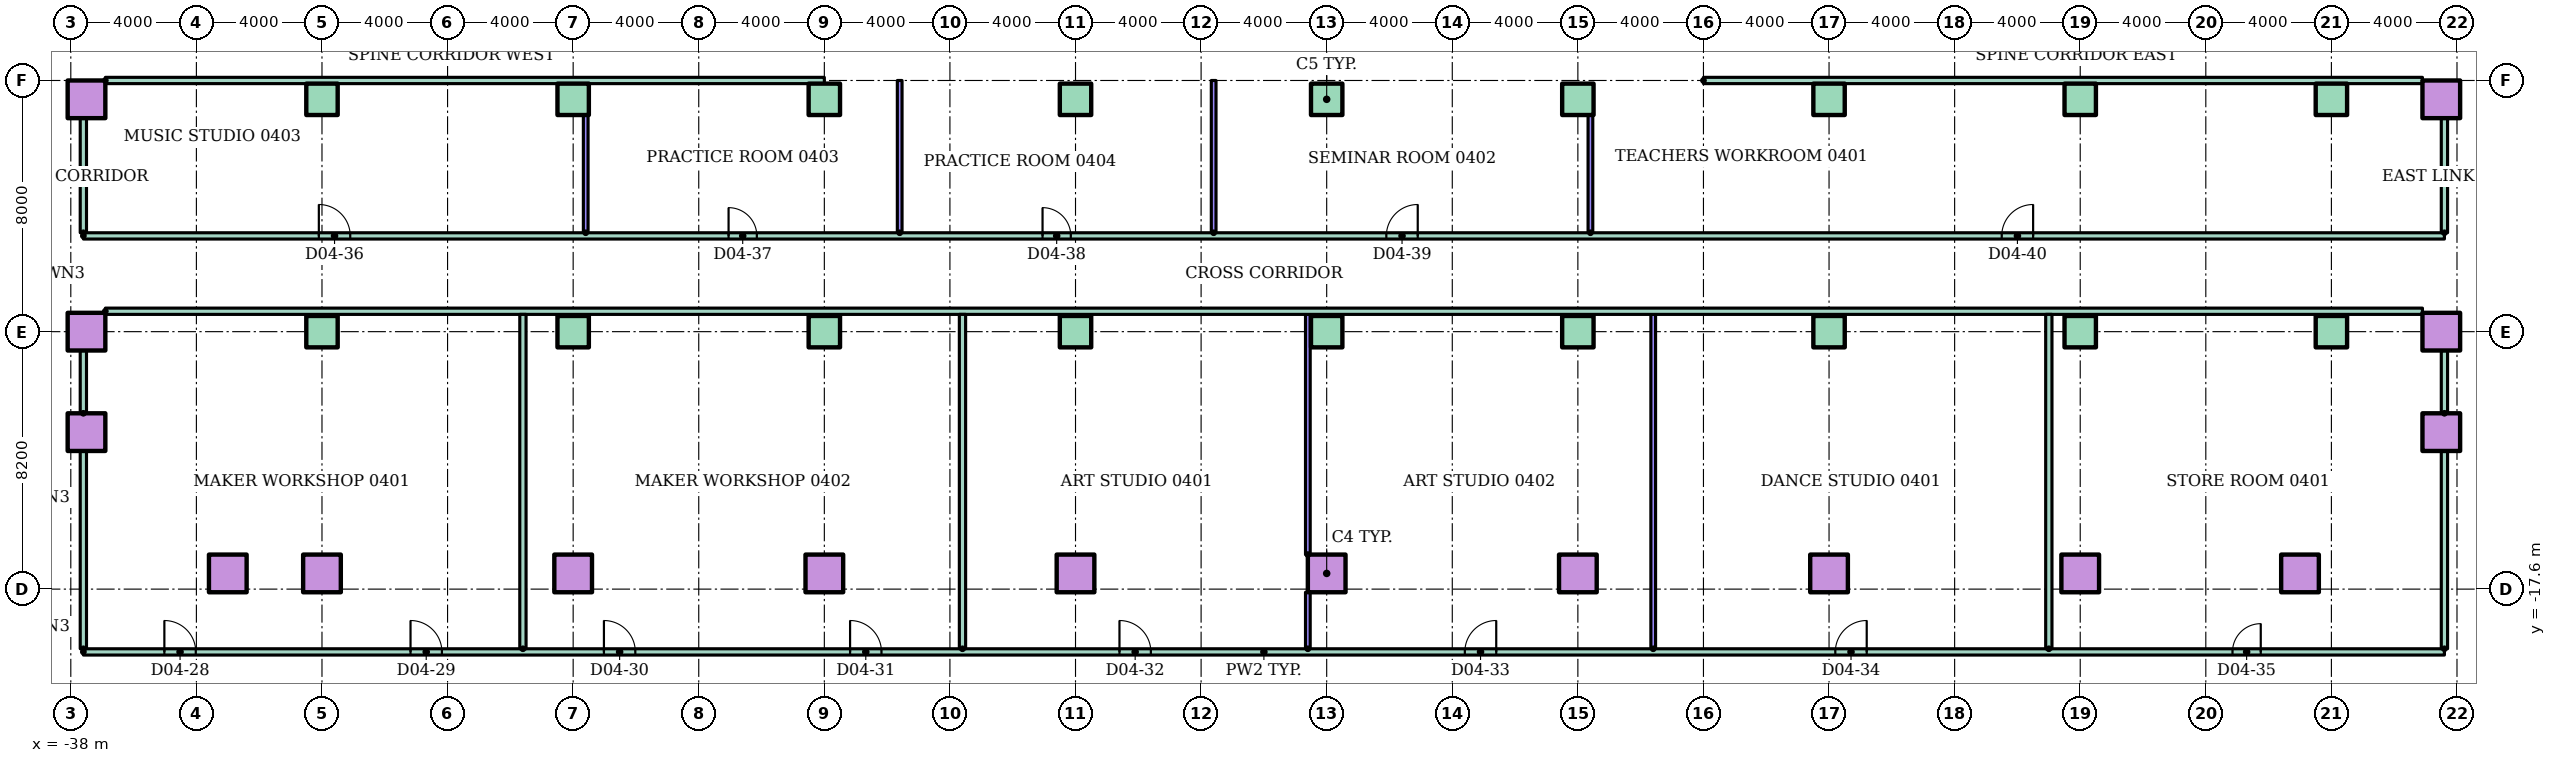
"""IFC4 building model, lengths in metres.
Left out: names, types, materials, properties, quantities, classifications, styles, units other than length and angle.
Written with IfcOpenShell. Run it as: python <this file> out.ifc"""

import sys

from ifc_helpers import new_model, si_unit, direction, frame, frame_2d, origin, origin_2d, place, context, subcontext, project, spatial, rectangle, hollow_rectangle, extrude, element, fill, save


model = new_model("IFC4")
c1 = context("Model", 3, precision=1e-05, world=origin(), true_north=direction((0.0, 1.0)))
c2 = subcontext(c1, "Body", "Model", "MODEL_VIEW")
j1 = project(units=[si_unit("LENGTHUNIT", "METRE"), si_unit("PLANEANGLEUNIT", "RADIAN")], contexts=[c1])
p1 = place(None, origin())
s1 = spatial("IfcSite", under=j1, at=p1, CompositionType="ELEMENT")
p2 = place(p1, origin())
s2 = spatial("IfcBuilding", under=s1, at=p2, CompositionType="ELEMENT")
p3 = place(p2, frame((0.0, 0.0, 18.0)))
s3 = spatial("IfcBuildingStorey", under=s2, at=p3, CompositionType="ELEMENT", Elevation=18.0)
for number, where in (
    (1, (-33.0, -17.1, 0.0)),
    (2, (-30.0, -17.1, 0.0)),
    (3, (-22.0, -17.1, 0.0)),
    (4, (-14.0, -17.1, 0.0)),
    (5, (-6.0, -17.1, 0.0)),
    (6, (2.0, -17.1, 0.0)),
    (7, (10.0, -17.1, 0.0)),
    (8, (18.0, -17.1, 0.0)),
    (9, (26.0, -17.1, 0.0)),
    (10, (33.0, -17.1, 0.0)),
    (11, (-37.5, -12.6, 0.0)),
    (12, (37.5, -12.6, 0.0)),
    (13, (-37.5, -9.4, 0.0)),
):
    element("IfcColumn", number, at=place(p3, frame(where)), inside=s3, PredefinedType="COLUMN", context=c2, shape_type="SweptSolid", body=[
        extrude(hollow_rectangle(XDim=1.2, YDim=1.2, WallThickness=0.06, at=origin_2d()), origin(), (0.0, 0.0, 1.0), 4.0),
    ])
for number, where in (
    (14, (-30.0, -9.4, 0.0)),
    (15, (-22.0, -9.4, 0.0)),
    (16, (-14.0, -9.4, 0.0)),
    (17, (-6.0, -9.4, 0.0)),
    (18, (2.0, -9.4, 0.0)),
    (19, (10.0, -9.4, 0.0)),
    (20, (18.0, -9.4, 0.0)),
    (21, (26.0, -9.4, 0.0)),
    (22, (34.0, -9.4, 0.0)),
):
    element("IfcColumn", number, at=place(p3, frame(where)), inside=s3, PredefinedType="COLUMN", context=c2, shape_type="SweptSolid", body=[
        extrude(rectangle(XDim=1.0, YDim=1.0, at=origin_2d()), origin(), (0.0, 0.0, 1.0), 4.0),
    ])
for number, where in (
    (23, (37.5, -9.4, 0.0)),
    (24, (-37.5, -2.0, 0.0)),
):
    element("IfcColumn", number, at=place(p3, frame(where)), inside=s3, PredefinedType="COLUMN", context=c2, shape_type="SweptSolid", body=[
        extrude(hollow_rectangle(XDim=1.2, YDim=1.2, WallThickness=0.06, at=origin_2d()), origin(), (0.0, 0.0, 1.0), 4.0),
    ])
for number, where in (
    (25, (-30.0, -2.0, 0.0)),
    (26, (-22.0, -2.0, 0.0)),
    (27, (-14.0, -2.0, 0.0)),
    (28, (-6.0, -2.0, 0.0)),
    (29, (2.0, -2.0, 0.0)),
    (30, (10.0, -2.0, 0.0)),
    (31, (18.0, -2.0, 0.0)),
    (32, (26.0, -2.0, 0.0)),
    (33, (34.0, -2.0, 0.0)),
):
    element("IfcColumn", number, at=place(p3, frame(where)), inside=s3, PredefinedType="COLUMN", context=c2, shape_type="SweptSolid", body=[
        extrude(rectangle(XDim=1.0, YDim=1.0, at=origin_2d()), origin(), (0.0, 0.0, 1.0), 4.0),
    ])
p4 = place(p3, frame((37.5, -2.0, 0.0)))
e34 = element("IfcColumn", 34, at=p4, inside=s3, PredefinedType="COLUMN", context=c2, shape_type="SweptSolid", body=[
    extrude(hollow_rectangle(XDim=1.2, YDim=1.2, WallThickness=0.06, at=origin_2d()), origin(), (0.0, 0.0, 1.0), 4.0),
])
p5 = place(p3, frame((-37.6, -19.6, 0.0)))
e35 = element("IfcWall", 35, at=p5, inside=s3, PredefinedType="PARTITIONING", context=c2, shape_type="SweptSolid", body=[
    extrude(rectangle(XDim=75.2, YDim=0.2, at=frame_2d((37.6, 0.0))), origin(), (0.0, 0.0, 1.0), 3.7),
])
p6 = place(p5, frame((2.58, 0.0, 0.0)))
e36 = element("IfcOpeningElement", 36, at=p6, cuts=e35, PredefinedType="OPENING", context=c2, shape_type="SweptSolid", body=[
    extrude(rectangle(XDim=1.0, YDim=2.1, at=frame_2d((0.5, 1.05))), frame((0.0, 0.11, 0.0), z_axis=(0.0, -1.0, 0.0), x_axis=(1.0, 0.0, 0.0)), (0.0, 0.0, 1.0), 0.22),
])
p7 = place(p5, frame((10.42, 0.0, 0.0)))
e37 = element("IfcOpeningElement", 37, at=p7, cuts=e35, PredefinedType="OPENING", context=c2, shape_type="SweptSolid", body=[
    extrude(rectangle(XDim=1.0, YDim=2.1, at=frame_2d((0.5, 1.05))), frame((0.0, 0.11, 0.0), z_axis=(0.0, -1.0, 0.0), x_axis=(1.0, 0.0, 0.0)), (0.0, 0.0, 1.0), 0.22),
])
p8 = place(p5, frame((16.58, 0.0, 0.0)))
e38 = element("IfcOpeningElement", 38, at=p8, cuts=e35, PredefinedType="OPENING", context=c2, shape_type="SweptSolid", body=[
    extrude(rectangle(XDim=1.0, YDim=2.1, at=frame_2d((0.5, 1.05))), frame((0.0, 0.11, 0.0), z_axis=(0.0, -1.0, 0.0), x_axis=(1.0, 0.0, 0.0)), (0.0, 0.0, 1.0), 0.22),
])
p9 = place(p5, frame((24.42, 0.0, 0.0)))
e39 = element("IfcOpeningElement", 39, at=p9, cuts=e35, PredefinedType="OPENING", context=c2, shape_type="SweptSolid", body=[
    extrude(rectangle(XDim=1.0, YDim=2.1, at=frame_2d((0.5, 1.05))), frame((0.0, 0.11, 0.0), z_axis=(0.0, -1.0, 0.0), x_axis=(1.0, 0.0, 0.0)), (0.0, 0.0, 1.0), 0.22),
])
p10 = place(p5, frame((33.0, 0.0, 0.0)))
e40 = element("IfcOpeningElement", 40, at=p10, cuts=e35, PredefinedType="OPENING", context=c2, shape_type="SweptSolid", body=[
    extrude(rectangle(XDim=1.0, YDim=2.1, at=frame_2d((0.5, 1.05))), frame((0.0, 0.11, 0.0), z_axis=(0.0, -1.0, 0.0), x_axis=(1.0, 0.0, 0.0)), (0.0, 0.0, 1.0), 0.22),
])
p11 = place(p5, frame((44.0, 0.0, 0.0)))
e41 = element("IfcOpeningElement", 41, at=p11, cuts=e35, PredefinedType="OPENING", context=c2, shape_type="SweptSolid", body=[
    extrude(rectangle(XDim=1.0, YDim=2.1, at=frame_2d((0.5, 1.05))), frame((0.0, 0.11, 0.0), z_axis=(0.0, -1.0, 0.0), x_axis=(1.0, 0.0, 0.0)), (0.0, 0.0, 1.0), 0.22),
])
p12 = place(p5, frame((55.8, 0.0, 0.0)))
e42 = element("IfcOpeningElement", 42, at=p12, cuts=e35, PredefinedType="OPENING", context=c2, shape_type="SweptSolid", body=[
    extrude(rectangle(XDim=1.0, YDim=2.1, at=frame_2d((0.5, 1.05))), frame((0.0, 0.11, 0.0), z_axis=(0.0, -1.0, 0.0), x_axis=(1.0, 0.0, 0.0)), (0.0, 0.0, 1.0), 0.22),
])
p13 = place(p5, frame((68.45, 0.0, 0.0)))
e43 = element("IfcOpeningElement", 43, at=p13, cuts=e35, PredefinedType="OPENING", context=c2, shape_type="SweptSolid", body=[
    extrude(rectangle(XDim=0.9, YDim=2.1, at=frame_2d((0.45, 1.05))), frame((0.0, 0.11, 0.0), z_axis=(0.0, -1.0, 0.0), x_axis=(1.0, 0.0, 0.0)), (0.0, 0.0, 1.0), 0.22),
])
p14 = place(p3, frame((-36.9, -8.75, 0.0)))
e44 = element("IfcWall", 44, at=p14, inside=s3, PredefinedType="PARTITIONING", context=c2, shape_type="SweptSolid", body=[
    extrude(rectangle(XDim=73.8, YDim=0.2, at=frame_2d((36.9, 0.0))), origin(), (0.0, 0.0, 1.0), 3.7),
])
p15 = place(p3, frame((-37.6, -6.35, 0.0)))
e45 = element("IfcWall", 45, at=p15, inside=s3, PredefinedType="PARTITIONING", context=c2, shape_type="SweptSolid", body=[
    extrude(rectangle(XDim=75.2, YDim=0.2, at=frame_2d((37.6, 0.0))), origin(), (0.0, 0.0, 1.0), 3.7),
])
p16 = place(p15, frame((7.5, 0.0, 0.0)))
e46 = element("IfcOpeningElement", 46, at=p16, cuts=e45, PredefinedType="OPENING", context=c2, shape_type="SweptSolid", body=[
    extrude(rectangle(XDim=1.0, YDim=2.1, at=frame_2d((0.5, 1.05))), frame((0.0, 0.11, 0.0), z_axis=(0.0, -1.0, 0.0), x_axis=(1.0, 0.0, 0.0)), (0.0, 0.0, 1.0), 0.22),
])
p17 = place(p15, frame((20.55, 0.0, 0.0)))
e47 = element("IfcOpeningElement", 47, at=p17, cuts=e45, PredefinedType="OPENING", context=c2, shape_type="SweptSolid", body=[
    extrude(rectangle(XDim=0.9, YDim=2.1, at=frame_2d((0.45, 1.05))), frame((0.0, 0.11, 0.0), z_axis=(0.0, -1.0, 0.0), x_axis=(1.0, 0.0, 0.0)), (0.0, 0.0, 1.0), 0.22),
])
p18 = place(p15, frame((30.55, 0.0, 0.0)))
e48 = element("IfcOpeningElement", 48, at=p18, cuts=e45, PredefinedType="OPENING", context=c2, shape_type="SweptSolid", body=[
    extrude(rectangle(XDim=0.9, YDim=2.1, at=frame_2d((0.45, 1.05))), frame((0.0, 0.11, 0.0), z_axis=(0.0, -1.0, 0.0), x_axis=(1.0, 0.0, 0.0)), (0.0, 0.0, 1.0), 0.22),
])
p19 = place(p15, frame((41.5, 0.0, 0.0)))
e49 = element("IfcOpeningElement", 49, at=p19, cuts=e45, PredefinedType="OPENING", context=c2, shape_type="SweptSolid", body=[
    extrude(rectangle(XDim=1.0, YDim=2.1, at=frame_2d((0.5, 1.05))), frame((0.0, 0.11, 0.0), z_axis=(0.0, -1.0, 0.0), x_axis=(1.0, 0.0, 0.0)), (0.0, 0.0, 1.0), 0.22),
])
p20 = place(p15, frame((61.1, 0.0, 0.0)))
e50 = element("IfcOpeningElement", 50, at=p20, cuts=e45, PredefinedType="OPENING", context=c2, shape_type="SweptSolid", body=[
    extrude(rectangle(XDim=1.0, YDim=2.1, at=frame_2d((0.5, 1.05))), frame((0.0, 0.11, 0.0), z_axis=(0.0, -1.0, 0.0), x_axis=(1.0, 0.0, 0.0)), (0.0, 0.0, 1.0), 0.22),
])
for number, where in (
    (51, (-36.9, -1.4, 0.0)),
    (52, (14.0, -1.4, 0.0)),
):
    element("IfcWall", number, at=place(p3, frame(where)), inside=s3, PredefinedType="PARTITIONING", context=c2, shape_type="SweptSolid", body=[
        extrude(rectangle(XDim=22.9, YDim=0.2, at=frame_2d((11.45, 0.0))), origin(), (0.0, 0.0, 1.0), 3.7),
    ])
p21 = place(p3, frame((-37.6, -19.5, 0.0), z_axis=(0.0, 0.0, 1.0), x_axis=(0.0, 1.0, 0.0)))
e53 = element("IfcWall", 53, at=p21, inside=s3, PredefinedType="PARTITIONING", context=c2, shape_type="SweptSolid", body=[
    extrude(rectangle(XDim=6.3, YDim=0.2, at=frame_2d((3.15, 0.0))), origin(), (0.0, 0.0, 1.0), 3.7),
])
p22 = place(p3, frame((-37.6, -12.0, 0.0), z_axis=(0.0, 0.0, 1.0), x_axis=(0.0, 1.0, 0.0)))
e54 = element("IfcWall", 54, at=p22, inside=s3, PredefinedType="PARTITIONING", context=c2, shape_type="SweptSolid", body=[
    extrude(rectangle(XDim=2.0, YDim=0.2, at=frame_2d((1.0, 0.0))), origin(), (0.0, 0.0, 1.0), 3.7),
])
p23 = place(p3, frame((-37.6, -6.25, 0.0), z_axis=(0.0, 0.0, 1.0), x_axis=(0.0, 1.0, 0.0)))
e55 = element("IfcWall", 55, at=p23, inside=s3, PredefinedType="PARTITIONING", context=c2, shape_type="SweptSolid", body=[
    extrude(rectangle(XDim=3.65, YDim=0.2, at=frame_2d((1.825, 0.0))), origin(), (0.0, 0.0, 1.0), 3.7),
])
p24 = place(p3, frame((-23.6, -19.5, 0.0), z_axis=(0.0, 0.0, 1.0), x_axis=(0.0, 1.0, 0.0)))
e56 = element("IfcWall", 56, at=p24, inside=s3, PredefinedType="PARTITIONING", context=c2, shape_type="SweptSolid", body=[
    extrude(rectangle(XDim=10.65, YDim=0.2, at=frame_2d((5.325, 0.0))), origin(), (0.0, 0.0, 1.0), 3.7),
])
p25 = place(p3, frame((-21.6, -6.25, 0.0), z_axis=(0.0, 0.0, 1.0), x_axis=(0.0, 1.0, 0.0)))
e57 = element("IfcWall", 57, at=p25, inside=s3, PredefinedType="PARTITIONING", context=c2, shape_type="SweptSolid", body=[
    extrude(rectangle(XDim=3.75, YDim=0.15, at=frame_2d((1.875, 0.0))), origin(), (0.0, 0.0, 1.0), 3.7),
])
p26 = place(p3, frame((-11.6, -6.25, 0.0), z_axis=(0.0, 0.0, 1.0), x_axis=(0.0, 1.0, 0.0)))
e58 = element("IfcWall", 58, at=p26, inside=s3, PredefinedType="PARTITIONING", context=c2, shape_type="SweptSolid", body=[
    extrude(rectangle(XDim=4.85, YDim=0.15, at=frame_2d((2.425, 0.0))), origin(), (0.0, 0.0, 1.0), 3.7),
])
p27 = place(p3, frame((-9.6, -19.5, 0.0), z_axis=(0.0, 0.0, 1.0), x_axis=(0.0, 1.0, 0.0)))
e59 = element("IfcWall", 59, at=p27, inside=s3, PredefinedType="PARTITIONING", context=c2, shape_type="SweptSolid", body=[
    extrude(rectangle(XDim=10.65, YDim=0.2, at=frame_2d((5.325, 0.0))), origin(), (0.0, 0.0, 1.0), 3.7),
])
p28 = place(p3, frame((-1.6, -6.25, 0.0), z_axis=(0.0, 0.0, 1.0), x_axis=(0.0, 1.0, 0.0)))
e60 = element("IfcWall", 60, at=p28, inside=s3, PredefinedType="PARTITIONING", context=c2, shape_type="SweptSolid", body=[
    extrude(rectangle(XDim=4.85, YDim=0.15, at=frame_2d((2.425, 0.0))), origin(), (0.0, 0.0, 1.0), 3.7),
])
p29 = place(p3, frame((1.4, -19.5, 0.0), z_axis=(0.0, 0.0, 1.0), x_axis=(0.0, 1.0, 0.0)))
e61 = element("IfcWall", 61, at=p29, inside=s3, PredefinedType="PARTITIONING", context=c2, shape_type="SweptSolid", body=[
    extrude(rectangle(XDim=1.8, YDim=0.15, at=frame_2d((0.9, 0.0))), origin(), (0.0, 0.0, 1.0), 3.7),
])
p30 = place(p3, frame((1.4, -16.5, 0.0), z_axis=(0.0, 0.0, 1.0), x_axis=(0.0, 1.0, 0.0)))
e62 = element("IfcWall", 62, at=p30, inside=s3, PredefinedType="PARTITIONING", context=c2, shape_type="SweptSolid", body=[
    extrude(rectangle(XDim=7.65, YDim=0.15, at=frame_2d((3.825, 0.0))), origin(), (0.0, 0.0, 1.0), 3.7),
])
p31 = place(p3, frame((10.4, -6.25, 0.0), z_axis=(0.0, 0.0, 1.0), x_axis=(0.0, 1.0, 0.0)))
e63 = element("IfcWall", 63, at=p31, inside=s3, PredefinedType="PARTITIONING", context=c2, shape_type="SweptSolid", body=[
    extrude(rectangle(XDim=3.75, YDim=0.15, at=frame_2d((1.875, 0.0))), origin(), (0.0, 0.0, 1.0), 3.7),
])
p32 = place(p3, frame((12.4, -19.5, 0.0), z_axis=(0.0, 0.0, 1.0), x_axis=(0.0, 1.0, 0.0)))
e64 = element("IfcWall", 64, at=p32, inside=s3, PredefinedType="PARTITIONING", context=c2, shape_type="SweptSolid", body=[
    extrude(rectangle(XDim=10.65, YDim=0.15, at=frame_2d((5.325, 0.0))), origin(), (0.0, 0.0, 1.0), 3.7),
])
p33 = place(p3, frame((25.0, -19.5, 0.0), z_axis=(0.0, 0.0, 1.0), x_axis=(0.0, 1.0, 0.0)))
e65 = element("IfcWall", 65, at=p33, inside=s3, PredefinedType="PARTITIONING", context=c2, shape_type="SweptSolid", body=[
    extrude(rectangle(XDim=10.65, YDim=0.2, at=frame_2d((5.325, 0.0))), origin(), (0.0, 0.0, 1.0), 3.7),
])
p34 = place(p3, frame((37.6, -19.5, 0.0), z_axis=(0.0, 0.0, 1.0), x_axis=(0.0, 1.0, 0.0)))
e66 = element("IfcWall", 66, at=p34, inside=s3, PredefinedType="PARTITIONING", context=c2, shape_type="SweptSolid", body=[
    extrude(rectangle(XDim=6.3, YDim=0.2, at=frame_2d((3.15, 0.0))), origin(), (0.0, 0.0, 1.0), 3.7),
])
p35 = place(p3, frame((37.6, -12.0, 0.0), z_axis=(0.0, 0.0, 1.0), x_axis=(0.0, 1.0, 0.0)))
e67 = element("IfcWall", 67, at=p35, inside=s3, PredefinedType="PARTITIONING", context=c2, shape_type="SweptSolid", body=[
    extrude(rectangle(XDim=2.0, YDim=0.2, at=frame_2d((1.0, 0.0))), origin(), (0.0, 0.0, 1.0), 3.7),
])
p36 = place(p3, frame((37.6, -6.25, 0.0), z_axis=(0.0, 0.0, 1.0), x_axis=(0.0, 1.0, 0.0)))
e68 = element("IfcWall", 68, at=p36, inside=s3, PredefinedType="PARTITIONING", context=c2, shape_type="SweptSolid", body=[
    extrude(rectangle(XDim=3.65, YDim=0.2, at=frame_2d((1.825, 0.0))), origin(), (0.0, 0.0, 1.0), 3.7),
])
p37 = place(p6, origin())
e69 = element("IfcDoor", 69, at=p37, inside=s3, OperationType="SINGLE_SWING_LEFT", PredefinedType="DOOR", context=c2, shape_type="SweptSolid", body=[
    extrude(rectangle(XDim=1.0, YDim=2.1, at=frame_2d((0.5, 1.05))), frame((0.0, 0.025, 0.0), z_axis=(0.0, -1.0, 0.0), x_axis=(1.0, 0.0, 0.0)), (0.0, 0.0, 1.0), 0.05),
])
fill(e36, e69)
p38 = place(p7, origin())
e70 = element("IfcDoor", 70, at=p38, inside=s3, OperationType="SINGLE_SWING_LEFT", PredefinedType="DOOR", context=c2, shape_type="SweptSolid", body=[
    extrude(rectangle(XDim=1.0, YDim=2.1, at=frame_2d((0.5, 1.05))), frame((0.0, 0.025, 0.0), z_axis=(0.0, -1.0, 0.0), x_axis=(1.0, 0.0, 0.0)), (0.0, 0.0, 1.0), 0.05),
])
fill(e37, e70)
p39 = place(p8, origin())
e71 = element("IfcDoor", 71, at=p39, inside=s3, OperationType="SINGLE_SWING_LEFT", PredefinedType="DOOR", context=c2, shape_type="SweptSolid", body=[
    extrude(rectangle(XDim=1.0, YDim=2.1, at=frame_2d((0.5, 1.05))), frame((0.0, 0.025, 0.0), z_axis=(0.0, -1.0, 0.0), x_axis=(1.0, 0.0, 0.0)), (0.0, 0.0, 1.0), 0.05),
])
fill(e38, e71)
p40 = place(p9, origin())
e72 = element("IfcDoor", 72, at=p40, inside=s3, OperationType="SINGLE_SWING_LEFT", PredefinedType="DOOR", context=c2, shape_type="SweptSolid", body=[
    extrude(rectangle(XDim=1.0, YDim=2.1, at=frame_2d((0.5, 1.05))), frame((0.0, 0.025, 0.0), z_axis=(0.0, -1.0, 0.0), x_axis=(1.0, 0.0, 0.0)), (0.0, 0.0, 1.0), 0.05),
])
fill(e39, e72)
p41 = place(p10, origin())
e73 = element("IfcDoor", 73, at=p41, inside=s3, OperationType="SINGLE_SWING_LEFT", PredefinedType="DOOR", context=c2, shape_type="SweptSolid", body=[
    extrude(rectangle(XDim=1.0, YDim=2.1, at=frame_2d((0.5, 1.05))), frame((0.0, 0.025, 0.0), z_axis=(0.0, -1.0, 0.0), x_axis=(1.0, 0.0, 0.0)), (0.0, 0.0, 1.0), 0.05),
])
fill(e40, e73)
p42 = place(p11, origin())
e74 = element("IfcDoor", 74, at=p42, inside=s3, OperationType="SINGLE_SWING_RIGHT", PredefinedType="DOOR", context=c2, shape_type="SweptSolid", body=[
    extrude(rectangle(XDim=1.0, YDim=2.1, at=frame_2d((0.5, 1.05))), frame((0.0, 0.025, 0.0), z_axis=(0.0, -1.0, 0.0), x_axis=(1.0, 0.0, 0.0)), (0.0, 0.0, 1.0), 0.05),
])
fill(e41, e74)
p43 = place(p12, origin())
e75 = element("IfcDoor", 75, at=p43, inside=s3, OperationType="SINGLE_SWING_RIGHT", PredefinedType="DOOR", context=c2, shape_type="SweptSolid", body=[
    extrude(rectangle(XDim=1.0, YDim=2.1, at=frame_2d((0.5, 1.05))), frame((0.0, 0.025, 0.0), z_axis=(0.0, -1.0, 0.0), x_axis=(1.0, 0.0, 0.0)), (0.0, 0.0, 1.0), 0.05),
])
fill(e42, e75)
p44 = place(p13, origin())
e76 = element("IfcDoor", 76, at=p44, inside=s3, OperationType="SINGLE_SWING_RIGHT", PredefinedType="DOOR", context=c2, shape_type="SweptSolid", body=[
    extrude(rectangle(XDim=0.9, YDim=2.1, at=frame_2d((0.45, 1.05))), frame((0.0, 0.025, 0.0), z_axis=(0.0, -1.0, 0.0), x_axis=(1.0, 0.0, 0.0)), (0.0, 0.0, 1.0), 0.05),
])
fill(e43, e76)
p45 = place(p16, origin())
e77 = element("IfcDoor", 77, at=p45, inside=s3, OperationType="SINGLE_SWING_LEFT", PredefinedType="DOOR", context=c2, shape_type="SweptSolid", body=[
    extrude(rectangle(XDim=1.0, YDim=2.1, at=frame_2d((0.5, 1.05))), frame((0.0, 0.025, 0.0), z_axis=(0.0, -1.0, 0.0), x_axis=(1.0, 0.0, 0.0)), (0.0, 0.0, 1.0), 0.05),
])
fill(e46, e77)
p46 = place(p17, origin())
e78 = element("IfcDoor", 78, at=p46, inside=s3, OperationType="SINGLE_SWING_LEFT", PredefinedType="DOOR", context=c2, shape_type="SweptSolid", body=[
    extrude(rectangle(XDim=0.9, YDim=2.1, at=frame_2d((0.45, 1.05))), frame((0.0, 0.025, 0.0), z_axis=(0.0, -1.0, 0.0), x_axis=(1.0, 0.0, 0.0)), (0.0, 0.0, 1.0), 0.05),
])
fill(e47, e78)
p47 = place(p18, origin())
e79 = element("IfcDoor", 79, at=p47, inside=s3, OperationType="SINGLE_SWING_LEFT", PredefinedType="DOOR", context=c2, shape_type="SweptSolid", body=[
    extrude(rectangle(XDim=0.9, YDim=2.1, at=frame_2d((0.45, 1.05))), frame((0.0, 0.025, 0.0), z_axis=(0.0, -1.0, 0.0), x_axis=(1.0, 0.0, 0.0)), (0.0, 0.0, 1.0), 0.05),
])
fill(e48, e79)
p48 = place(p19, origin())
e80 = element("IfcDoor", 80, at=p48, inside=s3, OperationType="SINGLE_SWING_RIGHT", PredefinedType="DOOR", context=c2, shape_type="SweptSolid", body=[
    extrude(rectangle(XDim=1.0, YDim=2.1, at=frame_2d((0.5, 1.05))), frame((0.0, 0.025, 0.0), z_axis=(0.0, -1.0, 0.0), x_axis=(1.0, 0.0, 0.0)), (0.0, 0.0, 1.0), 0.05),
])
fill(e49, e80)
p49 = place(p20, origin())
e81 = element("IfcDoor", 81, at=p49, inside=s3, OperationType="SINGLE_SWING_RIGHT", PredefinedType="DOOR", context=c2, shape_type="SweptSolid", body=[
    extrude(rectangle(XDim=1.0, YDim=2.1, at=frame_2d((0.5, 1.05))), frame((0.0, 0.025, 0.0), z_axis=(0.0, -1.0, 0.0), x_axis=(1.0, 0.0, 0.0)), (0.0, 0.0, 1.0), 0.05),
])
fill(e50, e81)
save(model, sys.argv[1])
